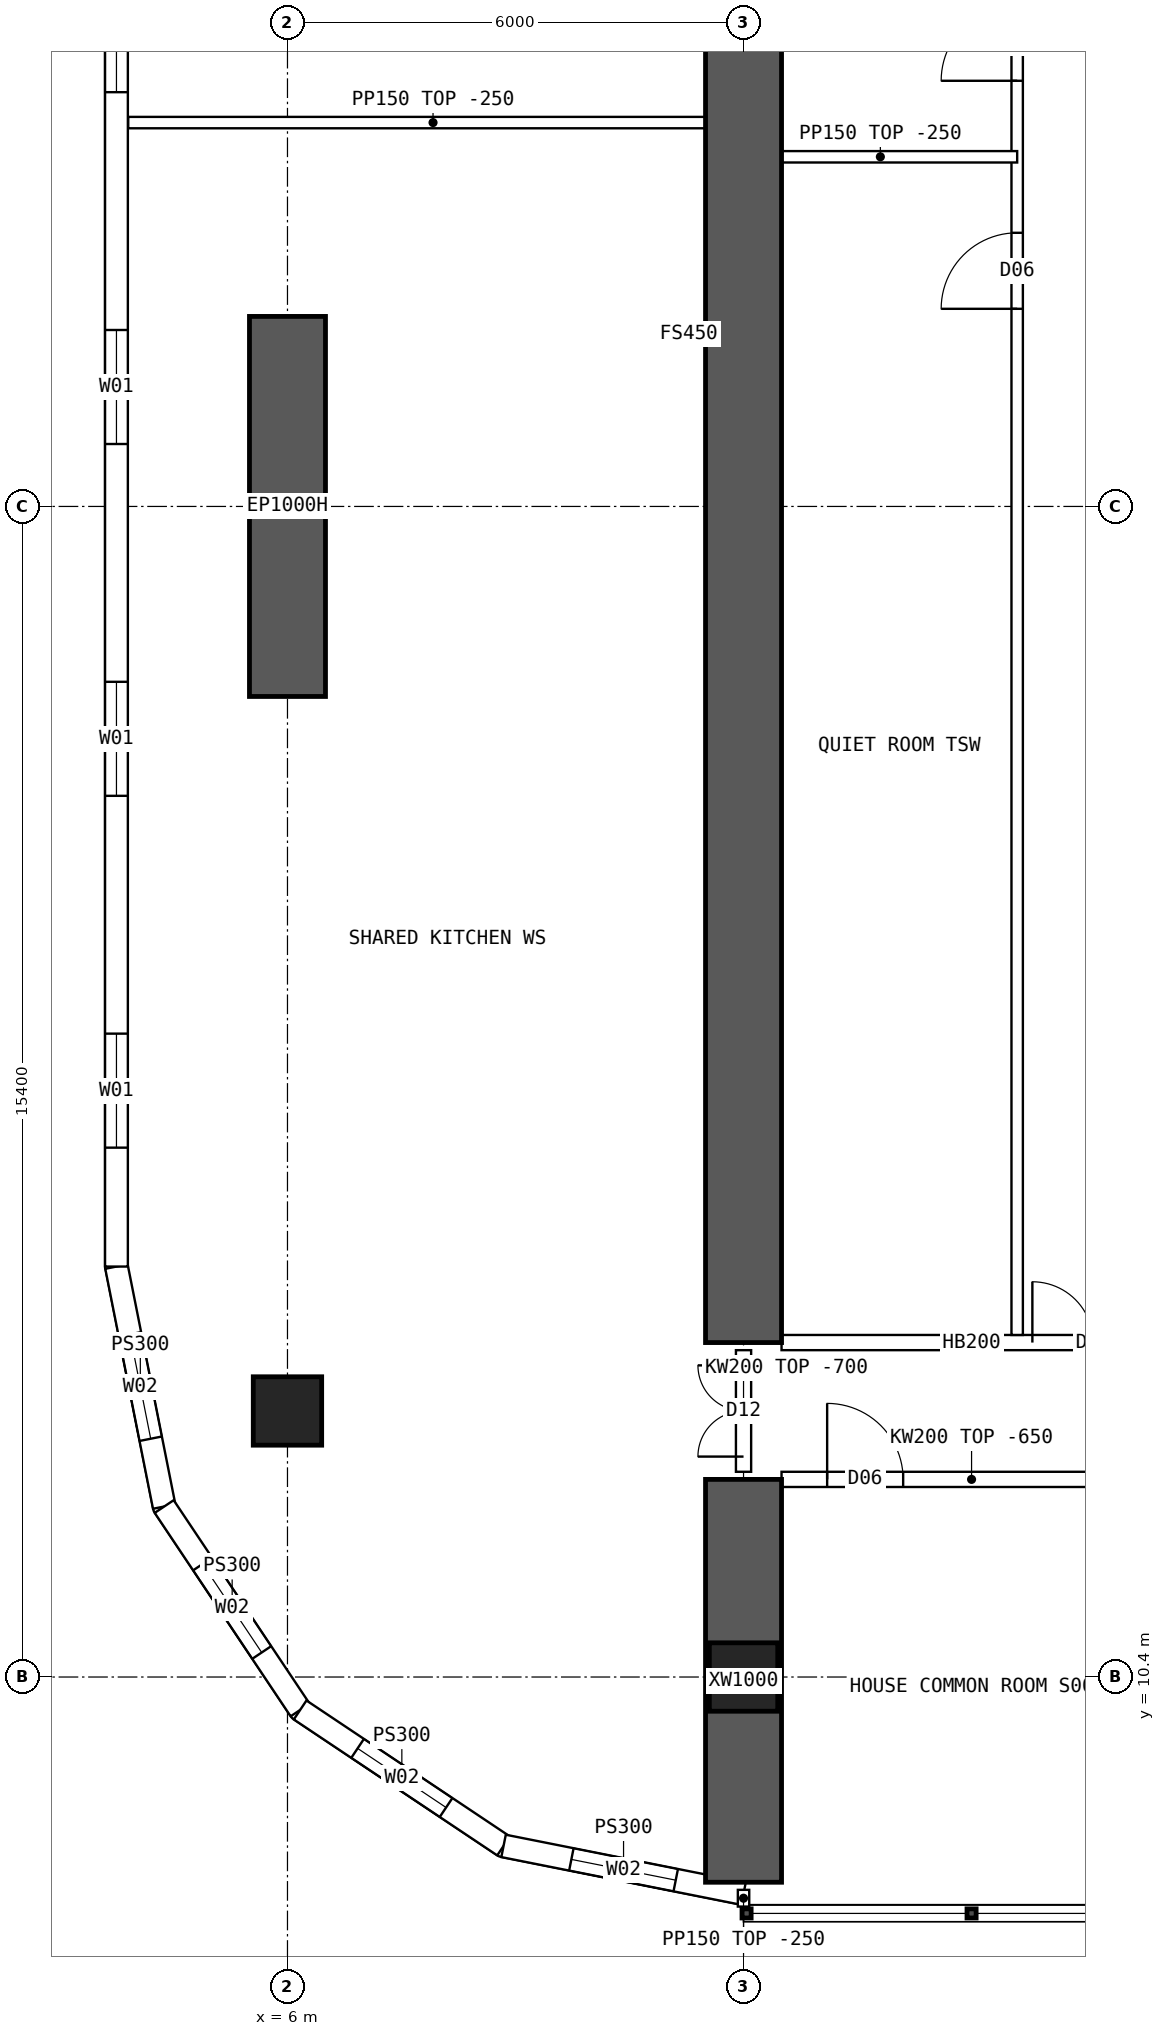
"""IFC4 building model, lengths in metres.
Left out: names, types, materials, properties, quantities, classifications, styles, units other than length and angle.
Written with IfcOpenShell. Run it as: python <this file> out.ifc"""

import sys

from ifc_helpers import new_model, si_unit, direction, frame, frame_2d, origin, origin_2d, place, context, subcontext, project, spatial, polyline, rectangle, hollow_rectangle, outline, extrude, element, fill, save


model = new_model("IFC4")
c1 = context("Model", 3, precision=1e-05, world=origin(), true_north=direction((0.0, 1.0)))
c2 = subcontext(c1, "Body", "Model", "MODEL_VIEW")
j1 = project(units=[si_unit("LENGTHUNIT", "METRE"), si_unit("PLANEANGLEUNIT", "RADIAN")], contexts=[c1])
p1 = place(None, origin())
s1 = spatial("IfcSite", under=j1, at=p1, CompositionType="ELEMENT")
p2 = place(p1, origin())
s2 = spatial("IfcBuilding", under=s1, at=p2, CompositionType="ELEMENT")
p3 = place(p2, frame((0.0, 0.0, 53.95)))
s3 = spatial("IfcBuildingStorey", under=s2, at=p3, CompositionType="ELEMENT", Elevation=53.95)
for number, where, z_axis, x_axis in (
    (1, (12.0, 10.4, 0.0), (0.0, 0.0, 1.0), (1.0, 0.0, 0.0)),
    (2, (6.0, 13.9, 0.0), (0.0, 0.0, 1.0), (1.0, 0.0, 0.0)),
):
    element("IfcColumn", number, at=place(p3, frame(where, z_axis=z_axis, x_axis=x_axis)), inside=s3, PredefinedType="COLUMN", context=c2, shape_type="SweptSolid", body=[
        extrude(hollow_rectangle(XDim=0.9, YDim=0.9, WallThickness=0.09, at=origin_2d()), origin(), (0.0, 0.0, 1.0), 3.75),
    ])
p4 = place(p3, frame((6.0, 23.3, 0.0), z_axis=(0.0, 0.0, 1.0), x_axis=(0.0, 1.0, 0.0)))
e3 = element("IfcWall", 3, at=p4, inside=s3, PredefinedType="SHEAR", context=c2, shape_type="SweptSolid", body=[
    extrude(rectangle(XDim=5.0, YDim=1.0, at=frame_2d((2.5, 0.0))), origin(), (0.0, 0.0, 1.0), 3.75),
])
p5 = place(p3, frame((12.0, 7.7, 0.0), z_axis=(0.0, 0.0, 1.0), x_axis=(0.0, 1.0, 0.0)))
e4 = element("IfcWall", 4, at=p5, inside=s3, PredefinedType="SHEAR", context=c2, shape_type="SweptSolid", body=[
    extrude(rectangle(XDim=5.3, YDim=1.0, at=frame_2d((2.65, 0.0))), origin(), (0.0, 0.0, 1.0), 3.75),
])
p6 = place(p3, frame((12.0, 14.8, 0.0), z_axis=(0.0, 0.0, 1.0), x_axis=(0.0, 1.0, 0.0)))
e5 = element("IfcWall", 5, at=p6, inside=s3, PredefinedType="SHEAR", context=c2, shape_type="SweptSolid", body=[
    extrude(rectangle(XDim=34.4, YDim=1.0, at=frame_2d((17.2, 0.0))), origin(), (0.0, 0.0, 1.0), 3.75),
])
p7 = place(p3, frame((3.75, 48.2, 0.0), z_axis=(0.0, 0.0, 1.0), x_axis=(0.0, -1.0, 0.0)))
e6 = element("IfcWall", 6, at=p7, inside=s3, PredefinedType="SOLIDWALL", context=c2, shape_type="SweptSolid", body=[
    extrude(outline(polyline([(-0.015, -0.15), (32.415, -0.15), (32.385, 0.15), (0.015, 0.15), (-0.015, -0.15)])), origin(), (0.0, 0.0, 1.0), 3.5),
])
p8 = place(p7, frame((1.564, 0.0, 0.9)))
e7 = element("IfcOpeningElement", 7, at=p8, cuts=e6, PredefinedType="OPENING", context=c2, shape_type="SweptSolid", body=[
    extrude(rectangle(XDim=1.5, YDim=2.0, at=frame_2d((0.75, 1.0))), frame((0.0, 0.16, 0.0), z_axis=(0.0, -1.0, 0.0), x_axis=(1.0, 0.0, 0.0)), (0.0, 0.0, 1.0), 0.32),
])
p9 = place(p7, frame((6.193, 0.0, 0.9)))
e8 = element("IfcOpeningElement", 8, at=p9, cuts=e6, PredefinedType="OPENING", context=c2, shape_type="SweptSolid", body=[
    extrude(rectangle(XDim=1.5, YDim=2.0, at=frame_2d((0.75, 1.0))), frame((0.0, 0.16, 0.0), z_axis=(0.0, -1.0, 0.0), x_axis=(1.0, 0.0, 0.0)), (0.0, 0.0, 1.0), 0.32),
])
p10 = place(p7, frame((10.822, 0.0, 0.9)))
e9 = element("IfcOpeningElement", 9, at=p10, cuts=e6, PredefinedType="OPENING", context=c2, shape_type="SweptSolid", body=[
    extrude(rectangle(XDim=1.5, YDim=2.0, at=frame_2d((0.75, 1.0))), frame((0.0, 0.16, 0.0), z_axis=(0.0, -1.0, 0.0), x_axis=(1.0, 0.0, 0.0)), (0.0, 0.0, 1.0), 0.32),
])
p11 = place(p7, frame((15.45, 0.0, 0.9)))
e10 = element("IfcOpeningElement", 10, at=p11, cuts=e6, PredefinedType="OPENING", context=c2, shape_type="SweptSolid", body=[
    extrude(rectangle(XDim=1.5, YDim=2.0, at=frame_2d((0.75, 1.0))), frame((0.0, 0.16, 0.0), z_axis=(0.0, -1.0, 0.0), x_axis=(1.0, 0.0, 0.0)), (0.0, 0.0, 1.0), 0.32),
])
p12 = place(p7, frame((20.079, 0.0, 0.9)))
e11 = element("IfcOpeningElement", 11, at=p12, cuts=e6, PredefinedType="OPENING", context=c2, shape_type="SweptSolid", body=[
    extrude(rectangle(XDim=1.5, YDim=2.0, at=frame_2d((0.75, 1.0))), frame((0.0, 0.16, 0.0), z_axis=(0.0, -1.0, 0.0), x_axis=(1.0, 0.0, 0.0)), (0.0, 0.0, 1.0), 0.32),
])
p13 = place(p7, frame((24.707, 0.0, 0.9)))
e12 = element("IfcOpeningElement", 12, at=p13, cuts=e6, PredefinedType="OPENING", context=c2, shape_type="SweptSolid", body=[
    extrude(rectangle(XDim=1.5, YDim=2.0, at=frame_2d((0.75, 1.0))), frame((0.0, 0.16, 0.0), z_axis=(0.0, -1.0, 0.0), x_axis=(1.0, 0.0, 0.0)), (0.0, 0.0, 1.0), 0.32),
])
p14 = place(p7, frame((29.336, 0.0, 0.9)))
e13 = element("IfcOpeningElement", 13, at=p14, cuts=e6, PredefinedType="OPENING", context=c2, shape_type="SweptSolid", body=[
    extrude(rectangle(XDim=1.5, YDim=2.0, at=frame_2d((0.75, 1.0))), frame((0.0, 0.16, 0.0), z_axis=(0.0, -1.0, 0.0), x_axis=(1.0, 0.0, 0.0)), (0.0, 0.0, 1.0), 0.32),
])
p15 = place(p3, frame((3.75, 15.8, 0.0), z_axis=(0.0, 0.0, 1.0), x_axis=(0.195065901187, -0.980790137692, 0.0)))
e14 = element("IfcWall", 14, at=p15, inside=s3, PredefinedType="SOLIDWALL", context=c2, shape_type="SweptSolid", body=[
    extrude(outline(polyline([(-0.015, -0.15), (3.249, -0.15), (3.189, 0.15), (0.015, 0.15), (-0.015, -0.15)])), origin(), (0.0, 0.0, 1.0), 3.5),
])
p16 = place(p15, frame((0.909, 0.0, 0.9)))
e15 = element("IfcOpeningElement", 15, at=p16, cuts=e14, PredefinedType="OPENING", context=c2, shape_type="SweptSolid", body=[
    extrude(rectangle(XDim=1.4, YDim=1.8, at=frame_2d((0.7, 0.9))), frame((0.0, 0.16, 0.0), z_axis=(0.0, -1.0, 0.0), x_axis=(1.0, 0.0, 0.0)), (0.0, 0.0, 1.0), 0.32),
])
p17 = place(p3, frame((4.378, 12.643, 0.0), z_axis=(0.0, 0.0, 1.0), x_axis=(0.555609954424, -0.831443069936, 0.0)))
e16 = element("IfcWall", 16, at=p17, inside=s3, PredefinedType="SOLIDWALL", context=c2, shape_type="SweptSolid", body=[
    extrude(outline(polyline([(-0.03, -0.15), (3.249, -0.15), (3.189, 0.15), (0.03, 0.15), (-0.03, -0.15)])), origin(), (0.0, 0.0, 1.0), 3.5),
])
p18 = place(p17, frame((0.909, 0.0, 0.9)))
e17 = element("IfcOpeningElement", 17, at=p18, cuts=e16, PredefinedType="OPENING", context=c2, shape_type="SweptSolid", body=[
    extrude(rectangle(XDim=1.4, YDim=1.8, at=frame_2d((0.7, 0.9))), frame((0.0, 0.16, 0.0), z_axis=(0.0, -1.0, 0.0), x_axis=(1.0, 0.0, 0.0)), (0.0, 0.0, 1.0), 0.32),
])
p19 = place(p3, frame((6.167, 9.966, 0.0), z_axis=(0.0, 0.0, 1.0), x_axis=(0.831478105043, -0.555557522525, 0.0)))
e18 = element("IfcWall", 18, at=p19, inside=s3, PredefinedType="SOLIDWALL", context=c2, shape_type="SweptSolid", body=[
    extrude(outline(polyline([(-0.03, -0.15), (3.249, -0.15), (3.189, 0.15), (0.03, 0.15), (-0.03, -0.15)])), origin(), (0.0, 0.0, 1.0), 3.5),
])
p20 = place(p19, frame((0.909, 0.0, 0.9)))
e19 = element("IfcOpeningElement", 19, at=p20, cuts=e18, PredefinedType="OPENING", context=c2, shape_type="SweptSolid", body=[
    extrude(rectangle(XDim=1.4, YDim=1.8, at=frame_2d((0.7, 0.9))), frame((0.0, 0.16, 0.0), z_axis=(0.0, -1.0, 0.0), x_axis=(1.0, 0.0, 0.0)), (0.0, 0.0, 1.0), 0.32),
])
p21 = place(p3, frame((8.843, 8.178, 0.0), z_axis=(0.0, 0.0, 1.0), x_axis=(0.980787251524, -0.195080412259, 0.0)))
e20 = element("IfcWall", 20, at=p21, inside=s3, PredefinedType="SOLIDWALL", context=c2, shape_type="SweptSolid", body=[
    extrude(outline(polyline([(-0.03, -0.15), (3.249, -0.15), (3.189, 0.15), (0.03, 0.15), (-0.03, -0.15)])), origin(), (0.0, 0.0, 1.0), 3.5),
])
p22 = place(p21, frame((0.909, 0.0, 0.9)))
e21 = element("IfcOpeningElement", 21, at=p22, cuts=e20, PredefinedType="OPENING", context=c2, shape_type="SweptSolid", body=[
    extrude(rectangle(XDim=1.4, YDim=1.8, at=frame_2d((0.7, 0.9))), frame((0.0, 0.16, 0.0), z_axis=(0.0, -1.0, 0.0), x_axis=(1.0, 0.0, 0.0)), (0.0, 0.0, 1.0), 0.32),
])
p23 = place(p3, frame((12.5, 13.0, 0.0), z_axis=(0.0, 0.0, 1.0), x_axis=(1.0, 0.0, 0.0)))
e22 = element("IfcWall", 22, at=p23, inside=s3, PredefinedType="SOLIDWALL", context=c2, shape_type="SweptSolid", body=[
    extrude(outline(polyline([(0.0, 0.0), (5.0, 0.0), (5.0, 3.1), (0.0, 3.1), (0.0, 0.0)])), frame((0.0, 0.1, 0.0), z_axis=(0.0, -1.0, 0.0), x_axis=(1.0, 0.0, 0.0)), (0.0, 0.0, 1.0), 0.2),
])
p24 = place(p23, frame((0.6, 0.0, 0.0)))
e23 = element("IfcOpeningElement", 23, at=p24, cuts=e22, PredefinedType="OPENING", context=c2, shape_type="SweptSolid", body=[
    extrude(rectangle(XDim=1.0, YDim=2.1, at=frame_2d((0.5, 1.05))), frame((0.0, 0.11, 0.0), z_axis=(0.0, -1.0, 0.0), x_axis=(1.0, 0.0, 0.0)), (0.0, 0.0, 1.0), 0.22),
])
p25 = place(p3, frame((12.5, 14.8, 0.0), z_axis=(0.0, 0.0, 1.0), x_axis=(1.0, 0.0, 0.0)))
e24 = element("IfcWall", 24, at=p25, inside=s3, PredefinedType="SOLIDWALL", context=c2, shape_type="SweptSolid", body=[
    extrude(rectangle(XDim=5.0, YDim=0.2, at=frame_2d((2.5, 0.0))), origin(), (0.0, 0.0, 1.0), 3.5),
])
p26 = place(p25, frame((3.3, 0.0, 0.0)))
e25 = element("IfcOpeningElement", 25, at=p26, cuts=e24, PredefinedType="OPENING", context=c2, shape_type="SweptSolid", body=[
    extrude(rectangle(XDim=1.6, YDim=2.1, at=frame_2d((0.8, 1.05))), frame((0.0, 0.11, 0.0), z_axis=(0.0, -1.0, 0.0), x_axis=(1.0, 0.0, 0.0)), (0.0, 0.0, 1.0), 0.22),
])
p27 = place(p3, frame((15.6, 14.9, 0.0), z_axis=(0.0, 0.0, 1.0), x_axis=(0.0, 1.0, 0.0)))
e26 = element("IfcWall", 26, at=p27, inside=s3, PredefinedType="PARTITIONING", context=c2, shape_type="SweptSolid", body=[
    extrude(rectangle(XDim=34.2, YDim=0.15, at=frame_2d((17.1, 0.0))), origin(), (0.0, 0.0, 1.0), 3.5),
])
p28 = place(p27, frame((13.5, 0.0, 0.0)))
e27 = element("IfcOpeningElement", 27, at=p28, cuts=e26, PredefinedType="OPENING", context=c2, shape_type="SweptSolid", body=[
    extrude(rectangle(XDim=1.0, YDim=2.1, at=frame_2d((0.5, 1.05))), frame((0.0, 0.085, 0.0), z_axis=(0.0, -1.0, 0.0), x_axis=(1.0, 0.0, 0.0)), (0.0, 0.0, 1.0), 0.17),
])
p29 = place(p27, frame((16.5, 0.0, 0.0)))
e28 = element("IfcOpeningElement", 28, at=p29, cuts=e26, PredefinedType="OPENING", context=c2, shape_type="SweptSolid", body=[
    extrude(rectangle(XDim=1.0, YDim=2.1, at=frame_2d((0.5, 1.05))), frame((0.0, 0.085, 0.0), z_axis=(0.0, -1.0, 0.0), x_axis=(1.0, 0.0, 0.0)), (0.0, 0.0, 1.0), 0.17),
])
p30 = place(p3, frame((12.0, 30.4, 0.0), z_axis=(0.0, 0.0, 1.0), x_axis=(1.0, 0.0, 0.0)))
e29 = element("IfcWall", 29, at=p30, inside=s3, PredefinedType="PARTITIONING", context=c2, shape_type="SweptSolid", body=[
    extrude(rectangle(XDim=3.6, YDim=0.15, at=frame_2d((1.8, 0.0))), origin(), (0.0, 0.0, 1.0), 3.5),
])
p31 = place(p3, frame((3.905, 30.85, 0.0), z_axis=(0.0, 0.0, 1.0), x_axis=(1.0, 0.0, 0.0)))
e30 = element("IfcWall", 30, at=p31, inside=s3, PredefinedType="PARTITIONING", context=c2, shape_type="SweptSolid", body=[
    extrude(outline(polyline([(0.0, 0.0), (8.02, 0.0), (8.02, 3.5), (2.397, 3.5), (2.395, 3.05), (1.797, 3.05), (1.795, 3.5), (0.0, 3.5), (0.0, 0.0)])), frame((0.0, 0.075, 0.0), z_axis=(0.0, -1.0, 0.0), x_axis=(1.0, 0.0, 0.0)), (0.0, 0.0, 1.0), 0.15),
])
p32 = place(p3, frame((12.0, 13.1, 0.0), z_axis=(0.0, 0.0, 1.0), x_axis=(0.0, 1.0, 0.0)))
e31 = element("IfcWall", 31, at=p32, inside=s3, PredefinedType="SOLIDWALL", context=c2, shape_type="SweptSolid", body=[
    extrude(outline(polyline([(0.0, 0.0), (1.6, 0.0), (1.6, 3.05), (0.0, 3.05), (0.0, 0.0)])), frame((0.0, 0.1, 0.0), z_axis=(0.0, -1.0, 0.0), x_axis=(1.0, 0.0, 0.0)), (0.0, 0.0, 1.0), 0.2),
])
p33 = place(p32, frame((0.2, 0.0, 0.0)))
e32 = element("IfcOpeningElement", 32, at=p33, cuts=e31, PredefinedType="OPENING", context=c2, shape_type="SweptSolid", body=[
    extrude(rectangle(XDim=1.2, YDim=2.1, at=frame_2d((0.6, 1.05))), frame((0.0, 0.11, 0.0), z_axis=(0.0, -1.0, 0.0), x_axis=(1.0, 0.0, 0.0)), (0.0, 0.0, 1.0), 0.22),
])
p34 = place(p3, frame((12.0, 7.6, 0.0), z_axis=(0.0, 0.0, 1.0), x_axis=(0.0, -1.0, 0.0)))
e33 = element("IfcWall", 33, at=p34, inside=s3, PredefinedType="PARTITIONING", context=c2, shape_type="SweptSolid", body=[
    extrude(rectangle(XDim=0.22, YDim=0.15, at=frame_2d((0.11, 0.0))), origin(), (0.0, 0.0, 1.0), 3.5),
])
p35 = place(p11, origin())
e34 = element("IfcWindow", 34, at=p35, inside=s3, PartitioningType="SINGLE_PANEL", PredefinedType="WINDOW", context=c2, shape_type="SweptSolid", body=[
    extrude(rectangle(XDim=1.5, YDim=2.0, at=frame_2d((0.75, 1.0))), frame((0.0, 0.03, 0.0), z_axis=(0.0, -1.0, 0.0), x_axis=(1.0, 0.0, 0.0)), (0.0, 0.0, 1.0), 0.06),
])
fill(e10, e34)
p36 = place(p12, origin())
e35 = element("IfcWindow", 35, at=p36, inside=s3, PartitioningType="SINGLE_PANEL", PredefinedType="WINDOW", context=c2, shape_type="SweptSolid", body=[
    extrude(rectangle(XDim=1.5, YDim=2.0, at=frame_2d((0.75, 1.0))), frame((0.0, 0.03, 0.0), z_axis=(0.0, -1.0, 0.0), x_axis=(1.0, 0.0, 0.0)), (0.0, 0.0, 1.0), 0.06),
])
fill(e11, e35)
p37 = place(p13, origin())
e36 = element("IfcWindow", 36, at=p37, inside=s3, PartitioningType="SINGLE_PANEL", PredefinedType="WINDOW", context=c2, shape_type="SweptSolid", body=[
    extrude(rectangle(XDim=1.5, YDim=2.0, at=frame_2d((0.75, 1.0))), frame((0.0, 0.03, 0.0), z_axis=(0.0, -1.0, 0.0), x_axis=(1.0, 0.0, 0.0)), (0.0, 0.0, 1.0), 0.06),
])
fill(e12, e36)
p38 = place(p14, origin())
e37 = element("IfcWindow", 37, at=p38, inside=s3, PartitioningType="SINGLE_PANEL", PredefinedType="WINDOW", context=c2, shape_type="SweptSolid", body=[
    extrude(rectangle(XDim=1.5, YDim=2.0, at=frame_2d((0.75, 1.0))), frame((0.0, 0.03, 0.0), z_axis=(0.0, -1.0, 0.0), x_axis=(1.0, 0.0, 0.0)), (0.0, 0.0, 1.0), 0.06),
])
fill(e13, e37)
p39 = place(p16, origin())
e38 = element("IfcWindow", 38, at=p39, inside=s3, PartitioningType="SINGLE_PANEL", PredefinedType="WINDOW", context=c2, shape_type="SweptSolid", body=[
    extrude(rectangle(XDim=1.4, YDim=1.8, at=frame_2d((0.7, 0.9))), frame((0.0, 0.03, 0.0), z_axis=(0.0, -1.0, 0.0), x_axis=(1.0, 0.0, 0.0)), (0.0, 0.0, 1.0), 0.06),
])
fill(e15, e38)
p40 = place(p18, origin())
e39 = element("IfcWindow", 39, at=p40, inside=s3, PartitioningType="SINGLE_PANEL", PredefinedType="WINDOW", context=c2, shape_type="SweptSolid", body=[
    extrude(rectangle(XDim=1.4, YDim=1.8, at=frame_2d((0.7, 0.9))), frame((0.0, 0.03, 0.0), z_axis=(0.0, -1.0, 0.0), x_axis=(1.0, 0.0, 0.0)), (0.0, 0.0, 1.0), 0.06),
])
fill(e17, e39)
p41 = place(p20, origin())
e40 = element("IfcWindow", 40, at=p41, inside=s3, PartitioningType="SINGLE_PANEL", PredefinedType="WINDOW", context=c2, shape_type="SweptSolid", body=[
    extrude(rectangle(XDim=1.4, YDim=1.8, at=frame_2d((0.7, 0.9))), frame((0.0, 0.03, 0.0), z_axis=(0.0, -1.0, 0.0), x_axis=(1.0, 0.0, 0.0)), (0.0, 0.0, 1.0), 0.06),
])
fill(e19, e40)
p42 = place(p22, origin())
e41 = element("IfcWindow", 41, at=p42, inside=s3, PartitioningType="SINGLE_PANEL", PredefinedType="WINDOW", context=c2, shape_type="SweptSolid", body=[
    extrude(rectangle(XDim=1.4, YDim=1.8, at=frame_2d((0.7, 0.9))), frame((0.0, 0.03, 0.0), z_axis=(0.0, -1.0, 0.0), x_axis=(1.0, 0.0, 0.0)), (0.0, 0.0, 1.0), 0.06),
])
fill(e21, e41)
p43 = place(p26, origin())
e42 = element("IfcDoor", 42, at=p43, inside=s3, OperationType="DOUBLE_DOOR_SINGLE_SWING", PredefinedType="DOOR", context=c2, shape_type="SweptSolid", body=[
    extrude(rectangle(XDim=1.6, YDim=2.1, at=frame_2d((0.8, 1.05))), frame((0.0, 0.025, 0.0), z_axis=(0.0, -1.0, 0.0), x_axis=(1.0, 0.0, 0.0)), (0.0, 0.0, 1.0), 0.05),
])
fill(e25, e42)
p44 = place(p24, origin())
e43 = element("IfcDoor", 43, at=p44, inside=s3, OperationType="SINGLE_SWING_LEFT", PredefinedType="DOOR", context=c2, shape_type="SweptSolid", body=[
    extrude(rectangle(XDim=1.0, YDim=2.1, at=frame_2d((0.5, 1.05))), frame((0.0, 0.025, 0.0), z_axis=(0.0, -1.0, 0.0), x_axis=(1.0, 0.0, 0.0)), (0.0, 0.0, 1.0), 0.05),
])
fill(e23, e43)
p45 = place(p28, origin())
e44 = element("IfcDoor", 44, at=p45, inside=s3, OperationType="SINGLE_SWING_LEFT", PredefinedType="DOOR", context=c2, shape_type="SweptSolid", body=[
    extrude(rectangle(XDim=1.0, YDim=2.1, at=frame_2d((0.5, 1.05))), frame((0.0, 0.025, 0.0), z_axis=(0.0, -1.0, 0.0), x_axis=(1.0, 0.0, 0.0)), (0.0, 0.0, 1.0), 0.05),
])
fill(e27, e44)
p46 = place(p29, origin())
e45 = element("IfcDoor", 45, at=p46, inside=s3, OperationType="SINGLE_SWING_LEFT", PredefinedType="DOOR", context=c2, shape_type="SweptSolid", body=[
    extrude(rectangle(XDim=1.0, YDim=2.1, at=frame_2d((0.5, 1.05))), frame((0.0, 0.025, 0.0), z_axis=(0.0, -1.0, 0.0), x_axis=(1.0, 0.0, 0.0)), (0.0, 0.0, 1.0), 0.05),
])
fill(e28, e45)
p47 = place(p33, origin())
e46 = element("IfcDoor", 46, at=p47, inside=s3, OperationType="DOUBLE_DOOR_SINGLE_SWING", PredefinedType="DOOR", context=c2, shape_type="SweptSolid", body=[
    extrude(rectangle(XDim=1.2, YDim=2.1, at=frame_2d((0.6, 1.05))), frame((0.0, 0.025, 0.0), z_axis=(0.0, -1.0, 0.0), x_axis=(1.0, 0.0, 0.0)), (0.0, 0.0, 1.0), 0.05),
])
fill(e32, e46)
save(model, sys.argv[1])
